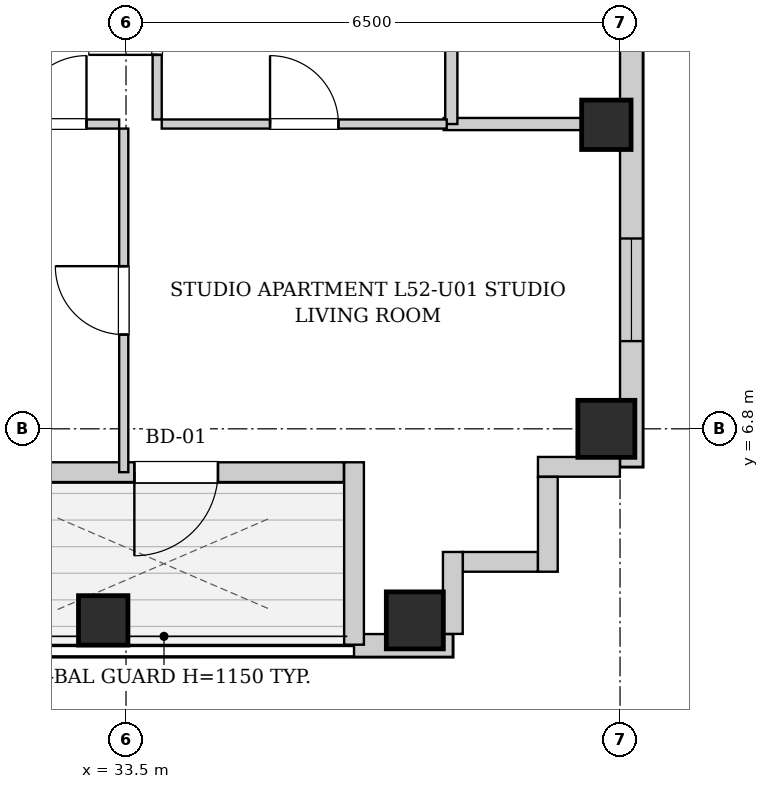
"""IFC4 building model, lengths in metres.
Left out: names, types, materials, properties, quantities, classifications, styles, units other than length and angle.
Written with IfcOpenShell. Run it as: python <this file> out.ifc"""

import sys

from ifc_helpers import new_model, si_unit, direction, frame, frame_2d, origin, origin_2d, place, context, subcontext, project, spatial, rectangle, extrude, element, fill, save


model = new_model("IFC4")
c1 = context("Model", 3, precision=1e-05, world=origin(), true_north=direction((0.0, 1.0)))
c2 = subcontext(c1, "Body", "Model", "MODEL_VIEW")
j1 = project(units=[si_unit("LENGTHUNIT", "METRE"), si_unit("PLANEANGLEUNIT", "RADIAN")], contexts=[c1])
p1 = place(None, origin())
s1 = spatial("IfcSite", under=j1, at=p1, CompositionType="ELEMENT")
p2 = place(p1, origin())
s2 = spatial("IfcBuilding", under=s1, at=p2, CompositionType="ELEMENT")
p3 = place(p2, frame((0.0, 0.0, 181.0)))
s3 = spatial("IfcBuildingStorey", under=s2, at=p3, CompositionType="ELEMENT", Elevation=181.0)
p4 = place(p3, frame((33.2, 4.28, 0.0), z_axis=(0.0, 0.0, 1.0), x_axis=(1.0, 0.0, 0.0)))
e1 = element("IfcColumn", 1, at=p4, inside=s3, PredefinedType="COLUMN", context=c2, shape_type="SweptSolid", body=[
    extrude(rectangle(XDim=0.65, YDim=0.65, at=origin_2d()), origin(), (0.0, 0.0, 1.0), 3.3),
])
for number, where, z_axis, x_axis in (
    (2, (37.3, 4.28, 0.0), (0.0, 0.0, 1.0), (1.0, 0.0, 0.0)),
    (3, (39.82, 6.8, 0.0), (0.0, 0.0, 1.0), (1.0, 0.0, 0.0)),
):
    element("IfcColumn", number, at=place(p3, frame(where, z_axis=z_axis, x_axis=x_axis)), inside=s3, PredefinedType="COLUMN", context=c2, shape_type="SweptSolid", body=[
        extrude(rectangle(XDim=0.75, YDim=0.75, at=origin_2d()), origin(), (0.0, 0.0, 1.0), 3.3),
    ])
p5 = place(p3, frame((39.82, 10.8, 0.0), z_axis=(0.0, 0.0, 1.0), x_axis=(1.0, 0.0, 0.0)))
e4 = element("IfcColumn", 4, at=p5, inside=s3, PredefinedType="COLUMN", context=c2, shape_type="SweptSolid", body=[
    extrude(rectangle(XDim=0.65, YDim=0.65, at=origin_2d()), origin(), (0.0, 0.0, 1.0), 3.3),
])
p6 = place(p3, frame((40.15, 37.7, 0.0), z_axis=(0.0, 0.0, 1.0), x_axis=(0.0, -1.0, 0.0)))
e5 = element("IfcWall", 5, at=p6, inside=s3, PredefinedType="SOLIDWALL", context=c2, shape_type="SweptSolid", body=[
    extrude(rectangle(XDim=31.4, YDim=0.3, at=frame_2d((15.7, 0.0))), origin(), (0.0, 0.0, 1.0), 3.04),
])
p7 = place(p6, frame((28.396, 0.0, 0.55)))
e6 = element("IfcOpeningElement", 6, at=p7, cuts=e5, PredefinedType="OPENING", context=c2, shape_type="SweptSolid", body=[
    extrude(rectangle(XDim=1.35, YDim=1.2, at=frame_2d((0.675, 0.6))), frame((0.0, 0.16, 0.0), z_axis=(0.0, -1.0, 0.0), x_axis=(1.0, 0.0, 0.0)), (0.0, 0.0, 1.0), 0.32),
])
p8 = place(p6, frame((1.653, 0.0, 0.55)))
e7 = element("IfcOpeningElement", 7, at=p8, cuts=e5, PredefinedType="OPENING", context=c2, shape_type="SweptSolid", body=[
    extrude(rectangle(XDim=1.35, YDim=1.2, at=frame_2d((0.675, 0.6))), frame((0.0, 0.16, 0.0), z_axis=(0.0, -1.0, 0.0), x_axis=(1.0, 0.0, 0.0)), (0.0, 0.0, 1.0), 0.32),
])
p9 = place(p6, frame((19.683, 0.0, 0.55)))
e8 = element("IfcOpeningElement", 8, at=p9, cuts=e5, PredefinedType="OPENING", context=c2, shape_type="SweptSolid", body=[
    extrude(rectangle(XDim=1.35, YDim=1.2, at=frame_2d((0.675, 0.6))), frame((0.0, 0.16, 0.0), z_axis=(0.0, -1.0, 0.0), x_axis=(1.0, 0.0, 0.0)), (0.0, 0.0, 1.0), 0.32),
])
p10 = place(p6, frame((10.367, 0.0, 0.55)))
e9 = element("IfcOpeningElement", 9, at=p10, cuts=e5, PredefinedType="OPENING", context=c2, shape_type="SweptSolid", body=[
    extrude(rectangle(XDim=1.35, YDim=1.2, at=frame_2d((0.675, 0.6))), frame((0.0, 0.16, 0.0), z_axis=(0.0, -1.0, 0.0), x_axis=(1.0, 0.0, 0.0)), (0.0, 0.0, 1.0), 0.32),
])
p11 = place(p3, frame((37.8, 3.95, 0.0), z_axis=(0.0, 0.0, 1.0), x_axis=(-1.0, 0.0, 0.0)))
e10 = element("IfcWall", 10, at=p11, inside=s3, PredefinedType="SOLIDWALL", context=c2, shape_type="SweptSolid", body=[
    extrude(rectangle(XDim=1.3, YDim=0.3, at=frame_2d((0.65, 0.0))), origin(), (0.0, 0.0, 1.0), 3.04),
])
p12 = place(p3, frame((36.5, 3.96, 0.0), z_axis=(0.0, 0.0, 1.0), x_axis=(0.0, 1.0, 0.0)))
e11 = element("IfcWall", 11, at=p12, inside=s3, PredefinedType="SOLIDWALL", context=c2, shape_type="SweptSolid", body=[
    extrude(rectangle(XDim=2.4, YDim=0.26, at=frame_2d((1.2, 0.0))), origin(), (0.0, 0.0, 1.0), 3.04),
])
p13 = place(p3, frame((36.366, 6.23, 0.0), z_axis=(0.0, 0.0, 1.0), x_axis=(-1.0, 0.0, 0.0)))
e12 = element("IfcWall", 12, at=p13, inside=s3, PredefinedType="SOLIDWALL", context=c2, shape_type="SweptSolid", body=[
    extrude(rectangle(XDim=4.732, YDim=0.26, at=frame_2d((2.366, 0.0))), origin(), (0.0, 0.0, 1.0), 3.04),
])
p14 = place(p13, frame((1.656, 0.0, 0.0)))
e13 = element("IfcOpeningElement", 13, at=p14, cuts=e12, PredefinedType="OPENING", context=c2, shape_type="SweptSolid", body=[
    extrude(rectangle(XDim=1.1, YDim=2.0, at=frame_2d((0.55, 1.0))), frame((0.0, 0.14, 0.0), z_axis=(0.0, -1.0, 0.0), x_axis=(1.0, 0.0, 0.0)), (0.0, 0.0, 1.0), 0.28),
])
p15 = place(p3, frame((39.998, 6.3, 0.0), z_axis=(0.0, 0.0, 1.0), x_axis=(-1.0, 0.0, 0.0)))
e14 = element("IfcWall", 14, at=p15, inside=s3, PredefinedType="SOLIDWALL", context=c2, shape_type="SweptSolid", body=[
    extrude(rectangle(XDim=1.078, YDim=0.26, at=frame_2d((0.539, 0.0))), origin(), (0.0, 0.0, 1.0), 3.04),
])
p16 = place(p3, frame((39.05, 6.168, 0.0), z_axis=(0.0, 0.0, 1.0), x_axis=(0.0, -1.0, 0.0)))
e15 = element("IfcWall", 15, at=p16, inside=s3, PredefinedType="SOLIDWALL", context=c2, shape_type="SweptSolid", body=[
    extrude(rectangle(XDim=1.248, YDim=0.26, at=frame_2d((0.624, 0.0))), origin(), (0.0, 0.0, 1.0), 3.04),
])
p17 = place(p3, frame((38.918, 5.05, 0.0), z_axis=(0.0, 0.0, 1.0), x_axis=(-1.0, 0.0, 0.0)))
e16 = element("IfcWall", 16, at=p17, inside=s3, PredefinedType="SOLIDWALL", context=c2, shape_type="SweptSolid", body=[
    extrude(rectangle(XDim=0.986, YDim=0.26, at=frame_2d((0.493, 0.0))), origin(), (0.0, 0.0, 1.0), 3.04),
])
p18 = place(p3, frame((37.8, 5.18, 0.0), z_axis=(0.0, 0.0, 1.0), x_axis=(0.0, -1.0, 0.0)))
e17 = element("IfcWall", 17, at=p18, inside=s3, PredefinedType="SOLIDWALL", context=c2, shape_type="SweptSolid", body=[
    extrude(rectangle(XDim=1.078, YDim=0.26, at=frame_2d((0.539, 0.0))), origin(), (0.0, 0.0, 1.0), 3.04),
])
p19 = place(p3, frame((37.68, 10.81, 0.0), z_axis=(0.0, 0.0, 1.0), x_axis=(1.0, 0.0, 0.0)))
e18 = element("IfcWall", 18, at=p19, inside=s3, PredefinedType="PARTITIONING", context=c2, shape_type="SweptSolid", body=[
    extrude(rectangle(XDim=2.34, YDim=0.16, at=frame_2d((1.17, 0.0))), origin(), (0.0, 0.0, 1.0), 3.04),
])
p20 = place(p3, frame((37.78, 10.81, 0.0), z_axis=(0.0, 0.0, 1.0), x_axis=(0.0, 1.0, 0.0)))
e19 = element("IfcWall", 19, at=p20, inside=s3, PredefinedType="PARTITIONING", context=c2, shape_type="SweptSolid", body=[
    extrude(rectangle(XDim=2.66, YDim=0.16, at=frame_2d((1.33, 0.0))), origin(), (0.0, 0.0, 1.0), 3.04),
])
p21 = place(p3, frame((33.91, 10.87, 0.0), z_axis=(0.0, 0.0, 1.0), x_axis=(0.0, 1.0, 0.0)))
e20 = element("IfcWall", 20, at=p21, inside=s3, PredefinedType="PARTITIONING", context=c2, shape_type="SweptSolid", body=[
    extrude(rectangle(XDim=2.6, YDim=0.12, at=frame_2d((1.3, 0.0))), origin(), (0.0, 0.0, 1.0), 3.04),
])
p22 = place(p21, frame((0.85, 0.0, 0.0)))
e21 = element("IfcOpeningElement", 21, at=p22, cuts=e20, PredefinedType="OPENING", context=c2, shape_type="SweptSolid", body=[
    extrude(rectangle(XDim=0.9, YDim=2.05, at=frame_2d((0.45, 1.025))), frame((0.0, 0.07, 0.0), z_axis=(0.0, -1.0, 0.0), x_axis=(1.0, 0.0, 0.0)), (0.0, 0.0, 1.0), 0.14),
])
p23 = place(p3, frame((31.65, 10.81, 0.0), z_axis=(0.0, 0.0, 1.0), x_axis=(1.0, 0.0, 0.0)))
e22 = element("IfcWall", 22, at=p23, inside=s3, PredefinedType="PARTITIONING", context=c2, shape_type="SweptSolid", body=[
    extrude(rectangle(XDim=1.76, YDim=0.12, at=frame_2d((0.88, 0.0))), origin(), (0.0, 0.0, 1.0), 3.04),
])
p24 = place(p23, frame((0.43, 0.0, 0.0)))
e23 = element("IfcOpeningElement", 23, at=p24, cuts=e22, PredefinedType="OPENING", context=c2, shape_type="SweptSolid", body=[
    extrude(rectangle(XDim=0.9, YDim=2.05, at=frame_2d((0.45, 1.025))), frame((0.0, 0.07, 0.0), z_axis=(0.0, -1.0, 0.0), x_axis=(1.0, 0.0, 0.0)), (0.0, 0.0, 1.0), 0.14),
])
p25 = place(p3, frame((33.97, 10.81, 0.0), z_axis=(0.0, 0.0, 1.0), x_axis=(1.0, 0.0, 0.0)))
e24 = element("IfcWall", 24, at=p25, inside=s3, PredefinedType="PARTITIONING", context=c2, shape_type="SweptSolid", body=[
    extrude(rectangle(XDim=3.75, YDim=0.12, at=frame_2d((1.875, 0.0))), origin(), (0.0, 0.0, 1.0), 3.04),
])
p26 = place(p25, frame((1.425, 0.0, 0.0)))
e25 = element("IfcOpeningElement", 25, at=p26, cuts=e24, PredefinedType="OPENING", context=c2, shape_type="SweptSolid", body=[
    extrude(rectangle(XDim=0.9, YDim=2.05, at=frame_2d((0.45, 1.025))), frame((0.0, 0.07, 0.0), z_axis=(0.0, -1.0, 0.0), x_axis=(1.0, 0.0, 0.0)), (0.0, 0.0, 1.0), 0.14),
])
p27 = place(p3, frame((33.47, 6.23, 0.0), z_axis=(0.0, 0.0, 1.0), x_axis=(0.0, 1.0, 0.0)))
e26 = element("IfcWall", 26, at=p27, inside=s3, PredefinedType="PARTITIONING", context=c2, shape_type="SweptSolid", body=[
    extrude(rectangle(XDim=4.52, YDim=0.12, at=frame_2d((2.26, 0.0))), origin(), (0.0, 0.0, 1.0), 3.04),
])
p28 = place(p27, frame((1.81, 0.0, 0.0)))
e27 = element("IfcOpeningElement", 27, at=p28, cuts=e26, PredefinedType="OPENING", context=c2, shape_type="SweptSolid", body=[
    extrude(rectangle(XDim=0.9, YDim=2.05, at=frame_2d((0.45, 1.025))), frame((0.0, 0.07, 0.0), z_axis=(0.0, -1.0, 0.0), x_axis=(1.0, 0.0, 0.0)), (0.0, 0.0, 1.0), 0.14),
])
p29 = place(p22, origin())
e28 = element("IfcDoor", 28, at=p29, inside=s3, OperationType="SINGLE_SWING_LEFT", PredefinedType="DOOR", context=c2, shape_type="SweptSolid", body=[
    extrude(rectangle(XDim=0.9, YDim=2.05, at=frame_2d((0.45, 1.025))), frame((0.0, 0.025, 0.0), z_axis=(0.0, -1.0, 0.0), x_axis=(1.0, 0.0, 0.0)), (0.0, 0.0, 1.0), 0.05),
])
fill(e21, e28)
p30 = place(p24, origin())
e29 = element("IfcDoor", 29, at=p30, inside=s3, OperationType="SINGLE_SWING_RIGHT", PredefinedType="DOOR", context=c2, shape_type="SweptSolid", body=[
    extrude(rectangle(XDim=0.9, YDim=2.05, at=frame_2d((0.45, 1.025))), frame((0.0, 0.025, 0.0), z_axis=(0.0, -1.0, 0.0), x_axis=(1.0, 0.0, 0.0)), (0.0, 0.0, 1.0), 0.05),
])
fill(e23, e29)
p31 = place(p26, origin())
e30 = element("IfcDoor", 30, at=p31, inside=s3, OperationType="SINGLE_SWING_LEFT", PredefinedType="DOOR", context=c2, shape_type="SweptSolid", body=[
    extrude(rectangle(XDim=0.9, YDim=2.05, at=frame_2d((0.45, 1.025))), frame((0.0, 0.025, 0.0), z_axis=(0.0, -1.0, 0.0), x_axis=(1.0, 0.0, 0.0)), (0.0, 0.0, 1.0), 0.05),
])
fill(e25, e30)
p32 = place(p28, origin())
e31 = element("IfcDoor", 31, at=p32, inside=s3, OperationType="SINGLE_SWING_RIGHT", PredefinedType="DOOR", context=c2, shape_type="SweptSolid", body=[
    extrude(rectangle(XDim=0.9, YDim=2.05, at=frame_2d((0.45, 1.025))), frame((0.0, 0.025, 0.0), z_axis=(0.0, -1.0, 0.0), x_axis=(1.0, 0.0, 0.0)), (0.0, 0.0, 1.0), 0.05),
])
fill(e27, e31)
p33 = place(p14, origin())
e32 = element("IfcDoor", 32, at=p33, inside=s3, OperationType="SINGLE_SWING_RIGHT", PredefinedType="DOOR", context=c2, shape_type="SweptSolid", body=[
    extrude(rectangle(XDim=1.1, YDim=2.0, at=frame_2d((0.55, 1.0))), frame((0.0, 0.025, 0.0), z_axis=(0.0, -1.0, 0.0), x_axis=(1.0, 0.0, 0.0)), (0.0, 0.0, 1.0), 0.05),
])
fill(e13, e32)
p34 = place(p7, origin())
e33 = element("IfcWindow", 33, at=p34, inside=s3, PartitioningType="SINGLE_PANEL", PredefinedType="WINDOW", context=c2, shape_type="SweptSolid", body=[
    extrude(rectangle(XDim=1.35, YDim=1.2, at=frame_2d((0.675, 0.6))), frame((0.0, 0.03, 0.0), z_axis=(0.0, -1.0, 0.0), x_axis=(1.0, 0.0, 0.0)), (0.0, 0.0, 1.0), 0.06),
])
fill(e6, e33)
save(model, sys.argv[1])
